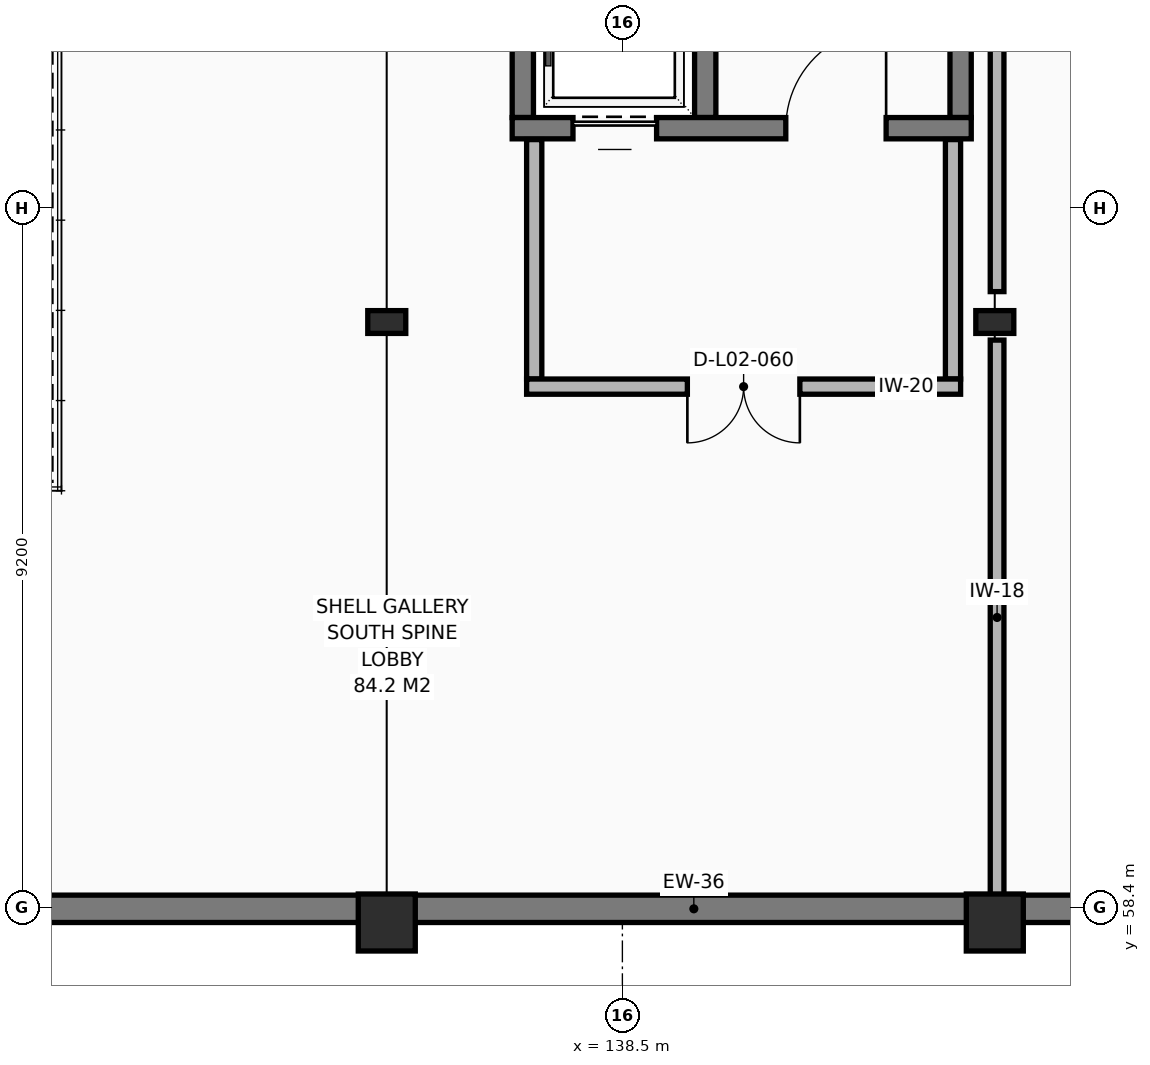
"""IFC4 building model, lengths in metres.
Left out: names, types, materials, properties, quantities, classifications, styles, units other than length and angle.
Written with IfcOpenShell. Run it as: python <this file> out.ifc"""

import sys

from ifc_helpers import new_model, si_unit, direction, frame, frame_2d, origin, origin_2d, place, context, subcontext, project, spatial, rectangle, i_section, extrude, element, fill, save


model = new_model("IFC4")
c1 = context("Model", 3, precision=1e-05, world=origin(), true_north=direction((0.0, 1.0)))
c2 = subcontext(c1, "Body", "Model", "MODEL_VIEW")
j1 = project(units=[si_unit("LENGTHUNIT", "METRE"), si_unit("PLANEANGLEUNIT", "RADIAN")], contexts=[c1])
p1 = place(None, origin())
s1 = spatial("IfcSite", under=j1, at=p1, CompositionType="ELEMENT")
p2 = place(p1, origin())
s2 = spatial("IfcBuilding", under=s1, at=p2, CompositionType="ELEMENT")
p3 = place(p2, frame((0.0, 0.0, 9.52)))
s3 = spatial("IfcBuildingStorey", under=s2, at=p3, CompositionType="ELEMENT", Elevation=9.52)
p4 = place(p3, frame((135.4, 58.2, 0.0), z_axis=(0.0, 0.0, 1.0), x_axis=(1.0, 0.0, 0.0)))
e1 = element("IfcColumn", 1, at=p4, inside=s3, PredefinedType="PILASTER", context=c2, shape_type="SweptSolid", body=[
    extrude(rectangle(XDim=0.75, YDim=0.75, at=origin_2d()), origin(), (0.0, 0.0, 1.0), 7.65),
])
p5 = place(p3, frame((135.4, 66.1, 0.0), z_axis=(0.0, 0.0, 1.0), x_axis=(1.0, 0.0, 0.0)))
e2 = element("IfcColumn", 2, at=p5, inside=s3, PredefinedType="COLUMN", context=c2, shape_type="SweptSolid", body=[
    extrude(i_section(OverallWidth=0.3, OverallDepth=0.5, WebThickness=0.014, FlangeThickness=0.028, FilletRadius=0.027, at=origin_2d()), origin(), (0.0, 0.0, 1.0), 7.65),
])
p6 = place(p3, frame((143.4, 58.2, 0.0), z_axis=(0.0, 0.0, 1.0), x_axis=(1.0, 0.0, 0.0)))
e3 = element("IfcColumn", 3, at=p6, inside=s3, PredefinedType="PILASTER", context=c2, shape_type="SweptSolid", body=[
    extrude(rectangle(XDim=0.75, YDim=0.75, at=origin_2d()), origin(), (0.0, 0.0, 1.0), 9.05),
])
p7 = place(p3, frame((143.4, 66.1, 0.0), z_axis=(0.0, 0.0, 1.0), x_axis=(1.0, 0.0, 0.0)))
e4 = element("IfcColumn", 4, at=p7, inside=s3, PredefinedType="COLUMN", context=c2, shape_type="SweptSolid", body=[
    extrude(i_section(OverallWidth=0.3, OverallDepth=0.5, WebThickness=0.014, FlangeThickness=0.028, FilletRadius=0.027, at=origin_2d()), origin(), (0.0, 0.0, 1.0), 9.05),
])
p8 = place(p3, frame((164.4, 58.38, 0.0), z_axis=(0.0, 0.0, 1.0), x_axis=(-1.0, 0.0, 0.0)))
e5 = element("IfcWall", 5, at=p8, inside=s3, PredefinedType="SOLIDWALL", context=c2, shape_type="SweptSolid", body=[
    extrude(rectangle(XDim=49.82, YDim=0.36, at=frame_2d((24.91, 0.0))), origin(), (0.0, 0.0, 1.0), 4.0),
])
p9 = place(p8, frame((6.117, 0.0, 0.85)))
e6 = element("IfcOpeningElement", 6, at=p9, cuts=e5, PredefinedType="OPENING", context=c2, shape_type="SweptSolid", body=[
    extrude(rectangle(XDim=2.7, YDim=1.5, at=frame_2d((1.35, 0.75))), frame((0.0, 0.19, 0.0), z_axis=(0.0, -1.0, 0.0), x_axis=(1.0, 0.0, 0.0)), (0.0, 0.0, 1.0), 0.38),
])
p10 = place(p8, frame((13.234, 0.0, 0.85)))
e7 = element("IfcOpeningElement", 7, at=p10, cuts=e5, PredefinedType="OPENING", context=c2, shape_type="SweptSolid", body=[
    extrude(rectangle(XDim=2.1, YDim=1.7, at=frame_2d((1.05, 0.85))), frame((0.0, 0.19, 0.0), z_axis=(0.0, -1.0, 0.0), x_axis=(1.0, 0.0, 0.0)), (0.0, 0.0, 1.0), 0.38),
])
p11 = place(p8, frame((34.586, 0.0, 0.85)))
e8 = element("IfcOpeningElement", 8, at=p11, cuts=e5, PredefinedType="OPENING", context=c2, shape_type="SweptSolid", body=[
    extrude(rectangle(XDim=3.1, YDim=1.5, at=frame_2d((1.55, 0.75))), frame((0.0, 0.19, 0.0), z_axis=(0.0, -1.0, 0.0), x_axis=(1.0, 0.0, 0.0)), (0.0, 0.0, 1.0), 0.38),
])
p12 = place(p8, frame((41.703, 0.0, 0.85)))
e9 = element("IfcOpeningElement", 9, at=p12, cuts=e5, PredefinedType="OPENING", context=c2, shape_type="SweptSolid", body=[
    extrude(rectangle(XDim=3.4, YDim=1.5, at=frame_2d((1.7, 0.75))), frame((0.0, 0.19, 0.0), z_axis=(0.0, -1.0, 0.0), x_axis=(1.0, 0.0, 0.0)), (0.0, 0.0, 1.0), 0.38),
])
for number, where, z_axis, x_axis in (
    (10, (142.95, 68.79, 0.0), (0.0, 0.0, 1.0), (0.0, 1.0, 0.0)),
    (11, (139.59, 76.49, 0.0), (0.0, 0.0, 1.0), (0.0, -1.0, 0.0)),
):
    element("IfcWall", number, at=place(p3, frame(where, z_axis=z_axis, x_axis=x_axis)), inside=s3, PredefinedType="SHEAR", context=c2, shape_type="SweptSolid", body=[
        extrude(rectangle(XDim=7.7, YDim=0.28, at=frame_2d((3.85, 0.0))), origin(), (0.0, 0.0, 1.0), 4.0),
    ])
p13 = place(p3, frame((137.19, 71.69, 0.0), z_axis=(0.0, 0.0, 1.0), x_axis=(0.0, -1.0, 0.0)))
e12 = element("IfcWall", 12, at=p13, inside=s3, PredefinedType="SHEAR", context=c2, shape_type="SweptSolid", body=[
    extrude(rectangle(XDim=2.9, YDim=0.28, at=frame_2d((1.45, 0.0))), origin(), (0.0, 0.0, 1.0), 4.0),
])
p14 = place(p3, frame((137.05, 68.65, 0.0), z_axis=(0.0, 0.0, 1.0), x_axis=(1.0, 0.0, 0.0)))
e13 = element("IfcWall", 13, at=p14, inside=s3, PredefinedType="SHEAR", context=c2, shape_type="SweptSolid", body=[
    extrude(rectangle(XDim=6.04, YDim=0.28, at=frame_2d((3.02, 0.0))), origin(), (0.0, 0.0, 1.0), 4.0),
])
p15 = place(p14, frame((0.8, 0.0, 0.0)))
e14 = element("IfcOpeningElement", 14, at=p15, cuts=e13, PredefinedType="OPENING", context=c2, shape_type="SweptSolid", body=[
    extrude(rectangle(XDim=1.1, YDim=2.12, at=frame_2d((0.55, 1.06))), frame((0.0, 0.15, 0.0), z_axis=(0.0, -1.0, 0.0), x_axis=(1.0, 0.0, 0.0)), (0.0, 0.0, 1.0), 0.3),
])
p16 = place(p14, frame((3.6, 0.0, 0.0)))
e15 = element("IfcOpeningElement", 15, at=p16, cuts=e13, PredefinedType="OPENING", context=c2, shape_type="SweptSolid", body=[
    extrude(rectangle(XDim=1.32, YDim=2.12, at=frame_2d((0.66, 1.06))), frame((0.0, 0.15, 0.0), z_axis=(0.0, -1.0, 0.0), x_axis=(1.0, 0.0, 0.0)), (0.0, 0.0, 1.0), 0.3),
])
for number, where, z_axis, x_axis in (
    (16, (142.85, 65.35, 0.0), (0.0, 0.0, 1.0), (0.0, 1.0, 0.0)),
    (17, (137.34, 68.5, 0.0), (0.0, 0.0, 1.0), (0.0, -1.0, 0.0)),
):
    element("IfcWall", number, at=place(p3, frame(where, z_axis=z_axis, x_axis=x_axis)), inside=s3, PredefinedType="PARTITIONING", context=c2, shape_type="SweptSolid", body=[
        extrude(rectangle(XDim=3.15, YDim=0.2, at=frame_2d((1.575, 0.0))), origin(), (0.0, 0.0, 1.0), 4.0),
    ])
p17 = place(p3, frame((142.95, 65.25, 0.0), z_axis=(0.0, 0.0, 1.0), x_axis=(-1.0, 0.0, 0.0)))
e18 = element("IfcWall", 18, at=p17, inside=s3, PredefinedType="PARTITIONING", context=c2, shape_type="SweptSolid", body=[
    extrude(rectangle(XDim=5.71, YDim=0.2, at=frame_2d((2.855, 0.0))), origin(), (0.0, 0.0, 1.0), 4.0),
])
p18 = place(p17, frame((2.115, 0.0, 0.0)))
e19 = element("IfcOpeningElement", 19, at=p18, cuts=e18, PredefinedType="OPENING", context=c2, shape_type="SweptSolid", body=[
    extrude(rectangle(XDim=1.48, YDim=2.15, at=frame_2d((0.74, 1.075))), frame((0.0, 0.11, 0.0), z_axis=(0.0, -1.0, 0.0), x_axis=(1.0, 0.0, 0.0)), (0.0, 0.0, 1.0), 0.22),
])
p19 = place(p3, frame((143.43, 73.762, 0.0), z_axis=(0.0, 0.0, 1.0), x_axis=(0.0, -1.0, 0.0)))
e20 = element("IfcWall", 20, at=p19, inside=s3, PredefinedType="PARTITIONING", context=c2, shape_type="SweptSolid", body=[
    extrude(rectangle(XDim=7.262, YDim=0.18, at=frame_2d((3.631, 0.0))), origin(), (0.0, 0.0, 1.0), 3.99),
])
p20 = place(p3, frame((143.43, 65.862, 0.0), z_axis=(0.0, 0.0, 1.0), x_axis=(0.0, -1.0, 0.0)))
e21 = element("IfcWall", 21, at=p20, inside=s3, PredefinedType="PARTITIONING", context=c2, shape_type="SweptSolid", body=[
    extrude(rectangle(XDim=7.298, YDim=0.18, at=frame_2d((3.649, 0.0))), origin(), (0.0, 0.0, 1.0), 3.99),
])
p21 = place(p15, origin())
e22 = element("IfcDoor", 22, at=p21, inside=s3, OperationType="SLIDING_TO_LEFT", PredefinedType="DOOR", context=c2, shape_type="SweptSolid", body=[
    extrude(rectangle(XDim=1.1, YDim=2.12, at=frame_2d((0.55, 1.06))), frame((0.0, 0.025, 0.0), z_axis=(0.0, -1.0, 0.0), x_axis=(1.0, 0.0, 0.0)), (0.0, 0.0, 1.0), 0.05),
])
fill(e14, e22)
p22 = place(p16, origin())
e23 = element("IfcDoor", 23, at=p22, inside=s3, OperationType="SINGLE_SWING_RIGHT", PredefinedType="DOOR", context=c2, shape_type="SweptSolid", body=[
    extrude(rectangle(XDim=1.32, YDim=2.12, at=frame_2d((0.66, 1.06))), frame((0.0, 0.025, 0.0), z_axis=(0.0, -1.0, 0.0), x_axis=(1.0, 0.0, 0.0)), (0.0, 0.0, 1.0), 0.05),
])
fill(e15, e23)
p23 = place(p18, origin())
e24 = element("IfcDoor", 24, at=p23, inside=s3, OperationType="DOUBLE_DOOR_SINGLE_SWING", PredefinedType="DOOR", context=c2, shape_type="SweptSolid", body=[
    extrude(rectangle(XDim=1.48, YDim=2.15, at=frame_2d((0.74, 1.075))), frame((0.0, 0.025, 0.0), z_axis=(0.0, -1.0, 0.0), x_axis=(1.0, 0.0, 0.0)), (0.0, 0.0, 1.0), 0.05),
])
fill(e19, e24)
save(model, sys.argv[1])
